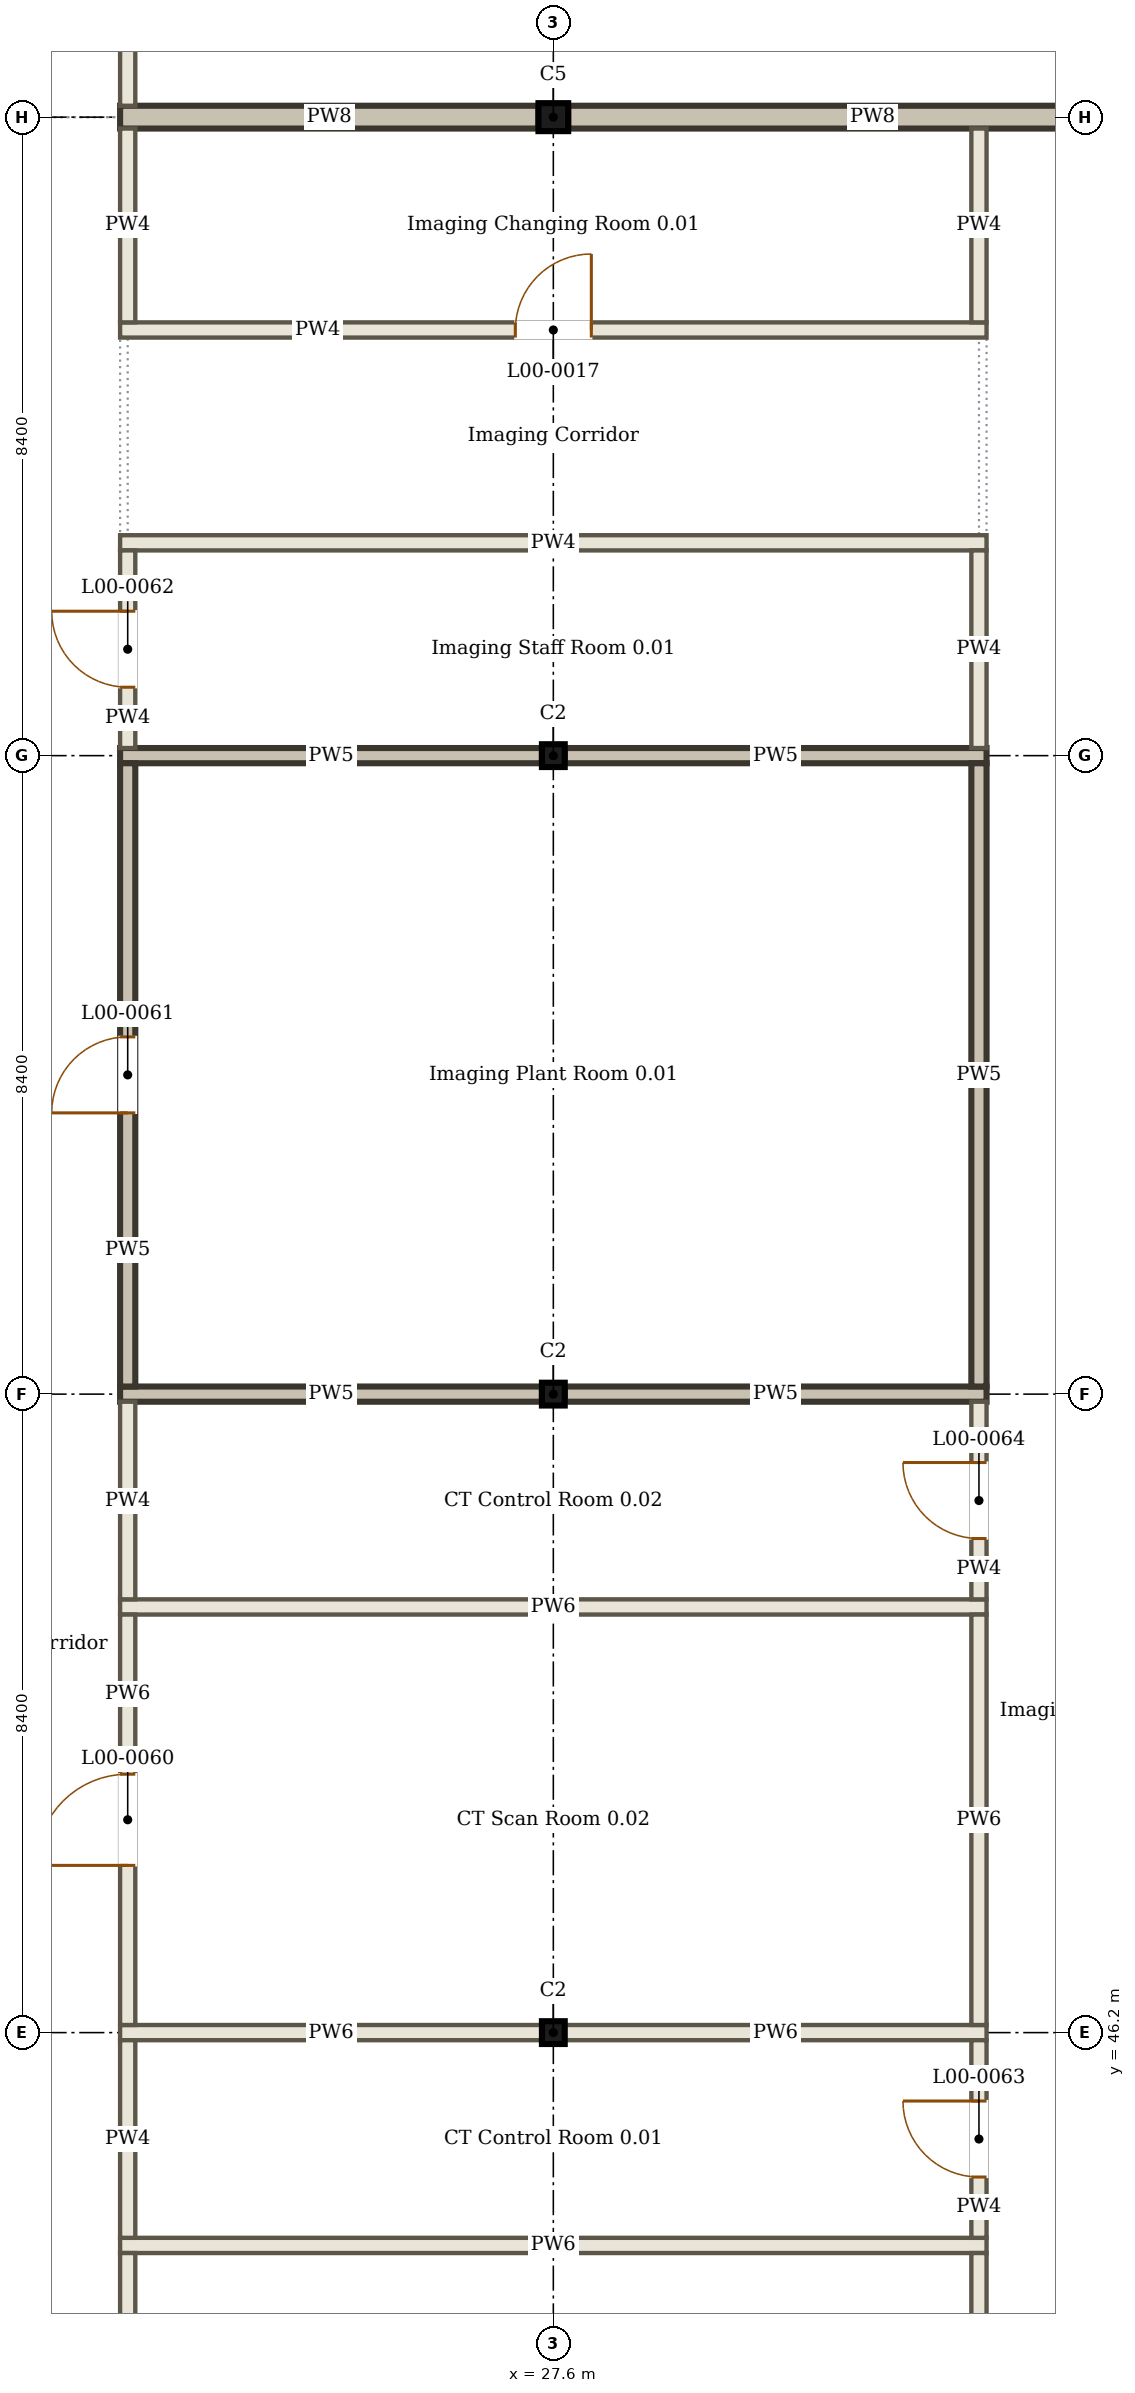
"""IFC4 building model, lengths in metres.
Left out: names, types, materials, properties, quantities, classifications, styles, units other than length and angle.
Written with IfcOpenShell. Run it as: python <this file> out.ifc"""

import sys

from ifc_helpers import new_model, si_unit, direction, frame, frame_2d, origin, origin_2d, place, context, subcontext, project, spatial, rectangle, i_section, extrude, element, fill, save


model = new_model("IFC4")
c1 = context("Model", 3, precision=1e-05, world=origin(), true_north=direction((0.0, 1.0)))
c2 = subcontext(c1, "Body", "Model", "MODEL_VIEW")
j1 = project(units=[si_unit("LENGTHUNIT", "METRE"), si_unit("PLANEANGLEUNIT", "RADIAN")], contexts=[c1])
p1 = place(None, origin())
s1 = spatial("IfcSite", under=j1, at=p1, CompositionType="ELEMENT")
p2 = place(p1, origin())
s2 = spatial("IfcBuilding", under=s1, at=p2, CompositionType="ELEMENT")
p3 = place(p2, origin())
s3 = spatial("IfcBuildingStorey", under=s2, at=p3, CompositionType="ELEMENT", Elevation=0.0)
for number, where, z_axis, x_axis in (
    (1, (27.6, 46.2, 0.0), (0.0, 0.0, 1.0), (1.0, 0.0, 0.0)),
    (2, (27.6, 54.6, 0.0), (0.0, 0.0, 1.0), (1.0, 0.0, 0.0)),
    (3, (27.6, 63.0, 0.0), (0.0, 0.0, 1.0), (1.0, 0.0, 0.0)),
):
    element("IfcColumn", number, at=place(p3, frame(where, z_axis=z_axis, x_axis=x_axis)), inside=s3, PredefinedType="COLUMN", context=c2, shape_type="SweptSolid", body=[
        extrude(i_section(OverallWidth=0.3, OverallDepth=0.3, WebThickness=0.011, FlangeThickness=0.019, FilletRadius=0.027, at=origin_2d()), origin(), (0.0, 0.0, 1.0), 4.5),
    ])
p4 = place(p3, frame((27.6, 71.4, 0.0), z_axis=(0.0, 0.0, 1.0), x_axis=(1.0, 0.0, 0.0)))
e4 = element("IfcColumn", 4, at=p4, inside=s3, PredefinedType="COLUMN", context=c2, shape_type="SweptSolid", body=[
    extrude(i_section(OverallWidth=0.391, OverallDepth=0.368, WebThickness=0.015, FlangeThickness=0.024, FilletRadius=0.027, at=origin_2d()), origin(), (0.0, 0.0, 1.0), 4.5),
])
p5 = place(p3, frame((21.9, 43.4, 0.0), z_axis=(0.0, 0.0, 1.0), x_axis=(1.0, 0.0, 0.0)))
e5 = element("IfcWall", 5, at=p5, inside=s3, PredefinedType="PARTITIONING", context=c2, shape_type="SweptSolid", body=[
    extrude(rectangle(XDim=11.4, YDim=0.2, at=frame_2d((5.7, 0.0))), origin(), (0.0, 0.0, 1.0), 3.8),
])
for number, where, z_axis, x_axis in (
    (6, (21.9, 46.2, 0.0), (0.0, 0.0, 1.0), (1.0, 0.0, 0.0)),
    (7, (27.75, 46.2, 0.0), (0.0, 0.0, 1.0), (1.0, 0.0, 0.0)),
):
    element("IfcWall", number, at=place(p3, frame(where, z_axis=z_axis, x_axis=x_axis)), inside=s3, PredefinedType="PARTITIONING", context=c2, shape_type="SweptSolid", body=[
        extrude(rectangle(XDim=5.55, YDim=0.2, at=frame_2d((2.775, 0.0))), origin(), (0.0, 0.0, 1.0), 3.8),
    ])
p6 = place(p3, frame((21.9, 51.8, 0.0), z_axis=(0.0, 0.0, 1.0), x_axis=(1.0, 0.0, 0.0)))
e8 = element("IfcWall", 8, at=p6, inside=s3, PredefinedType="PARTITIONING", context=c2, shape_type="SweptSolid", body=[
    extrude(rectangle(XDim=11.4, YDim=0.2, at=frame_2d((5.7, 0.0))), origin(), (0.0, 0.0, 1.0), 3.8),
])
for number, where, z_axis, x_axis in (
    (9, (21.9, 54.6, 0.0), (0.0, 0.0, 1.0), (1.0, 0.0, 0.0)),
    (10, (27.75, 54.6, 0.0), (0.0, 0.0, 1.0), (1.0, 0.0, 0.0)),
    (11, (21.9, 63.0, 0.0), (0.0, 0.0, 1.0), (1.0, 0.0, 0.0)),
    (12, (27.75, 63.0, 0.0), (0.0, 0.0, 1.0), (1.0, 0.0, 0.0)),
):
    element("IfcWall", number, at=place(p3, frame(where, z_axis=z_axis, x_axis=x_axis)), inside=s3, PredefinedType="SOLIDWALL", context=c2, shape_type="SweptSolid", body=[
        extrude(rectangle(XDim=5.55, YDim=0.2, at=frame_2d((2.775, 0.0))), origin(), (0.0, 0.0, 1.0), 3.8),
    ])
p7 = place(p3, frame((21.9, 65.8, 0.0), z_axis=(0.0, 0.0, 1.0), x_axis=(1.0, 0.0, 0.0)))
e13 = element("IfcWall", 13, at=p7, inside=s3, PredefinedType="PARTITIONING", context=c2, shape_type="SweptSolid", body=[
    extrude(rectangle(XDim=11.4, YDim=0.2, at=frame_2d((5.7, 0.0))), origin(), (0.0, 0.0, 1.0), 3.8),
])
p8 = place(p3, frame((21.9, 68.6, 0.0), z_axis=(0.0, 0.0, 1.0), x_axis=(1.0, 0.0, 0.0)))
e14 = element("IfcWall", 14, at=p8, inside=s3, PredefinedType="PARTITIONING", context=c2, shape_type="SweptSolid", body=[
    extrude(rectangle(XDim=11.4, YDim=0.2, at=frame_2d((5.7, 0.0))), origin(), (0.0, 0.0, 1.0), 3.8),
])
p9 = place(p8, frame((5.2, 0.0, 0.0)))
e15 = element("IfcOpeningElement", 15, at=p9, cuts=e14, PredefinedType="OPENING", context=c2, shape_type="SweptSolid", body=[
    extrude(rectangle(XDim=1.0, YDim=2.1, at=frame_2d((0.5, 1.05))), frame((0.0, 0.11, 0.0), z_axis=(0.0, -1.0, 0.0), x_axis=(1.0, 0.0, 0.0)), (0.0, 0.0, 1.0), 0.22),
])
p10 = place(p3, frame((21.9, 71.4, 0.0), z_axis=(0.0, 0.0, 1.0), x_axis=(1.0, 0.0, 0.0)))
e16 = element("IfcWall", 16, at=p10, inside=s3, PredefinedType="SOLIDWALL", context=c2, shape_type="SweptSolid", body=[
    extrude(rectangle(XDim=5.505, YDim=0.3, at=frame_2d((2.752, 0.0))), origin(), (0.0, 0.0, 1.0), 3.85),
])
p11 = place(p3, frame((27.795, 71.4, 0.0), z_axis=(0.0, 0.0, 1.0), x_axis=(1.0, 0.0, 0.0)))
e17 = element("IfcWall", 17, at=p11, inside=s3, PredefinedType="SOLIDWALL", context=c2, shape_type="SweptSolid", body=[
    extrude(rectangle(XDim=8.009, YDim=0.3, at=frame_2d((4.004, 0.0))), origin(), (0.0, 0.0, 1.0), 3.85),
])
p12 = place(p3, frame((22.0, 37.9, 0.0), z_axis=(0.0, 0.0, 1.0), x_axis=(0.0, 1.0, 0.0)))
e18 = element("IfcWall", 18, at=p12, inside=s3, PredefinedType="PARTITIONING", context=c2, shape_type="SweptSolid", body=[
    extrude(rectangle(XDim=5.4, YDim=0.2, at=frame_2d((2.7, 0.0))), origin(), (0.0, 0.0, 1.0), 3.8),
])
p13 = place(p12, frame((2.1, 0.0, 0.0)))
e19 = element("IfcOpeningElement", 19, at=p13, cuts=e18, PredefinedType="OPENING", context=c2, shape_type="SweptSolid", body=[
    extrude(rectangle(XDim=1.2, YDim=2.1, at=frame_2d((0.6, 1.05))), frame((0.0, 0.11, 0.0), z_axis=(0.0, -1.0, 0.0), x_axis=(1.0, 0.0, 0.0)), (0.0, 0.0, 1.0), 0.22),
])
p14 = place(p3, frame((22.0, 43.5, 0.0), z_axis=(0.0, 0.0, 1.0), x_axis=(0.0, 1.0, 0.0)))
e20 = element("IfcWall", 20, at=p14, inside=s3, PredefinedType="PARTITIONING", context=c2, shape_type="SweptSolid", body=[
    extrude(rectangle(XDim=2.6, YDim=0.2, at=frame_2d((1.3, 0.0))), origin(), (0.0, 0.0, 1.0), 3.8),
])
p15 = place(p3, frame((22.0, 46.3, 0.0), z_axis=(0.0, 0.0, 1.0), x_axis=(0.0, 1.0, 0.0)))
e21 = element("IfcWall", 21, at=p15, inside=s3, PredefinedType="PARTITIONING", context=c2, shape_type="SweptSolid", body=[
    extrude(rectangle(XDim=5.4, YDim=0.2, at=frame_2d((2.7, 0.0))), origin(), (0.0, 0.0, 1.0), 3.8),
])
p16 = place(p15, frame((2.1, 0.0, 0.0)))
e22 = element("IfcOpeningElement", 22, at=p16, cuts=e21, PredefinedType="OPENING", context=c2, shape_type="SweptSolid", body=[
    extrude(rectangle(XDim=1.2, YDim=2.1, at=frame_2d((0.6, 1.05))), frame((0.0, 0.11, 0.0), z_axis=(0.0, -1.0, 0.0), x_axis=(1.0, 0.0, 0.0)), (0.0, 0.0, 1.0), 0.22),
])
p17 = place(p3, frame((22.0, 51.9, 0.0), z_axis=(0.0, 0.0, 1.0), x_axis=(0.0, 1.0, 0.0)))
e23 = element("IfcWall", 23, at=p17, inside=s3, PredefinedType="PARTITIONING", context=c2, shape_type="SweptSolid", body=[
    extrude(rectangle(XDim=2.6, YDim=0.2, at=frame_2d((1.3, 0.0))), origin(), (0.0, 0.0, 1.0), 3.8),
])
p18 = place(p3, frame((22.0, 54.7, 0.0), z_axis=(0.0, 0.0, 1.0), x_axis=(0.0, 1.0, 0.0)))
e24 = element("IfcWall", 24, at=p18, inside=s3, PredefinedType="SOLIDWALL", context=c2, shape_type="SweptSolid", body=[
    extrude(rectangle(XDim=8.2, YDim=0.2, at=frame_2d((4.1, 0.0))), origin(), (0.0, 0.0, 1.0), 3.8),
])
p19 = place(p18, frame((3.6, 0.0, 0.0)))
e25 = element("IfcOpeningElement", 25, at=p19, cuts=e24, PredefinedType="OPENING", context=c2, shape_type="SweptSolid", body=[
    extrude(rectangle(XDim=1.0, YDim=2.1, at=frame_2d((0.5, 1.05))), frame((0.0, 0.11, 0.0), z_axis=(0.0, -1.0, 0.0), x_axis=(1.0, 0.0, 0.0)), (0.0, 0.0, 1.0), 0.22),
])
p20 = place(p3, frame((22.0, 63.1, 0.0), z_axis=(0.0, 0.0, 1.0), x_axis=(0.0, 1.0, 0.0)))
e26 = element("IfcWall", 26, at=p20, inside=s3, PredefinedType="PARTITIONING", context=c2, shape_type="SweptSolid", body=[
    extrude(rectangle(XDim=2.6, YDim=0.2, at=frame_2d((1.3, 0.0))), origin(), (0.0, 0.0, 1.0), 3.8),
])
p21 = place(p20, frame((0.8, 0.0, 0.0)))
e27 = element("IfcOpeningElement", 27, at=p21, cuts=e26, PredefinedType="OPENING", context=c2, shape_type="SweptSolid", body=[
    extrude(rectangle(XDim=1.0, YDim=2.1, at=frame_2d((0.5, 1.05))), frame((0.0, 0.11, 0.0), z_axis=(0.0, -1.0, 0.0), x_axis=(1.0, 0.0, 0.0)), (0.0, 0.0, 1.0), 0.22),
])
p22 = place(p3, frame((22.0, 68.7, 0.0), z_axis=(0.0, 0.0, 1.0), x_axis=(0.0, 1.0, 0.0)))
e28 = element("IfcWall", 28, at=p22, inside=s3, PredefinedType="PARTITIONING", context=c2, shape_type="SweptSolid", body=[
    extrude(rectangle(XDim=2.55, YDim=0.2, at=frame_2d((1.275, 0.0))), origin(), (0.0, 0.0, 1.0), 3.95),
])
p23 = place(p3, frame((22.0, 71.55, 0.0), z_axis=(0.0, 0.0, 1.0), x_axis=(0.0, 1.0, 0.0)))
e29 = element("IfcWall", 29, at=p23, inside=s3, PredefinedType="PARTITIONING", context=c2, shape_type="SweptSolid", body=[
    extrude(rectangle(XDim=13.75, YDim=0.2, at=frame_2d((6.875, 0.0))), origin(), (0.0, 0.0, 1.0), 3.8),
])
p24 = place(p3, frame((33.2, 37.9, 0.0), z_axis=(0.0, 0.0, 1.0), x_axis=(0.0, 1.0, 0.0)))
e30 = element("IfcWall", 30, at=p24, inside=s3, PredefinedType="PARTITIONING", context=c2, shape_type="SweptSolid", body=[
    extrude(rectangle(XDim=5.4, YDim=0.2, at=frame_2d((2.7, 0.0))), origin(), (0.0, 0.0, 1.0), 3.8),
])
p25 = place(p3, frame((33.2, 43.5, 0.0), z_axis=(0.0, 0.0, 1.0), x_axis=(0.0, 1.0, 0.0)))
e31 = element("IfcWall", 31, at=p25, inside=s3, PredefinedType="PARTITIONING", context=c2, shape_type="SweptSolid", body=[
    extrude(rectangle(XDim=2.6, YDim=0.2, at=frame_2d((1.3, 0.0))), origin(), (0.0, 0.0, 1.0), 3.8),
])
p26 = place(p25, frame((0.8, 0.0, 0.0)))
e32 = element("IfcOpeningElement", 32, at=p26, cuts=e31, PredefinedType="OPENING", context=c2, shape_type="SweptSolid", body=[
    extrude(rectangle(XDim=1.0, YDim=2.1, at=frame_2d((0.5, 1.05))), frame((0.0, 0.11, 0.0), z_axis=(0.0, -1.0, 0.0), x_axis=(1.0, 0.0, 0.0)), (0.0, 0.0, 1.0), 0.22),
])
p27 = place(p3, frame((33.2, 46.3, 0.0), z_axis=(0.0, 0.0, 1.0), x_axis=(0.0, 1.0, 0.0)))
e33 = element("IfcWall", 33, at=p27, inside=s3, PredefinedType="PARTITIONING", context=c2, shape_type="SweptSolid", body=[
    extrude(rectangle(XDim=5.4, YDim=0.2, at=frame_2d((2.7, 0.0))), origin(), (0.0, 0.0, 1.0), 3.8),
])
p28 = place(p3, frame((33.2, 51.9, 0.0), z_axis=(0.0, 0.0, 1.0), x_axis=(0.0, 1.0, 0.0)))
e34 = element("IfcWall", 34, at=p28, inside=s3, PredefinedType="PARTITIONING", context=c2, shape_type="SweptSolid", body=[
    extrude(rectangle(XDim=2.6, YDim=0.2, at=frame_2d((1.3, 0.0))), origin(), (0.0, 0.0, 1.0), 3.8),
])
p29 = place(p28, frame((0.8, 0.0, 0.0)))
e35 = element("IfcOpeningElement", 35, at=p29, cuts=e34, PredefinedType="OPENING", context=c2, shape_type="SweptSolid", body=[
    extrude(rectangle(XDim=1.0, YDim=2.1, at=frame_2d((0.5, 1.05))), frame((0.0, 0.11, 0.0), z_axis=(0.0, -1.0, 0.0), x_axis=(1.0, 0.0, 0.0)), (0.0, 0.0, 1.0), 0.22),
])
p30 = place(p3, frame((33.2, 54.7, 0.0), z_axis=(0.0, 0.0, 1.0), x_axis=(0.0, 1.0, 0.0)))
e36 = element("IfcWall", 36, at=p30, inside=s3, PredefinedType="SOLIDWALL", context=c2, shape_type="SweptSolid", body=[
    extrude(rectangle(XDim=8.2, YDim=0.2, at=frame_2d((4.1, 0.0))), origin(), (0.0, 0.0, 1.0), 3.8),
])
p31 = place(p3, frame((33.2, 63.1, 0.0), z_axis=(0.0, 0.0, 1.0), x_axis=(0.0, 1.0, 0.0)))
e37 = element("IfcWall", 37, at=p31, inside=s3, PredefinedType="PARTITIONING", context=c2, shape_type="SweptSolid", body=[
    extrude(rectangle(XDim=2.6, YDim=0.2, at=frame_2d((1.3, 0.0))), origin(), (0.0, 0.0, 1.0), 3.8),
])
p32 = place(p3, frame((33.2, 68.7, 0.0), z_axis=(0.0, 0.0, 1.0), x_axis=(0.0, 1.0, 0.0)))
e38 = element("IfcWall", 38, at=p32, inside=s3, PredefinedType="PARTITIONING", context=c2, shape_type="SweptSolid", body=[
    extrude(rectangle(XDim=2.55, YDim=0.2, at=frame_2d((1.275, 0.0))), origin(), (0.0, 0.0, 1.0), 3.95),
])
p33 = place(p9, origin())
e39 = element("IfcDoor", 39, at=p33, inside=s3, OperationType="SINGLE_SWING_RIGHT", PredefinedType="DOOR", context=c2, shape_type="SweptSolid", body=[
    extrude(rectangle(XDim=1.0, YDim=2.1, at=frame_2d((0.5, 1.05))), frame((0.0, 0.025, 0.0), z_axis=(0.0, -1.0, 0.0), x_axis=(1.0, 0.0, 0.0)), (0.0, 0.0, 1.0), 0.05),
])
fill(e15, e39)
p34 = place(p16, origin())
e40 = element("IfcDoor", 40, at=p34, inside=s3, OperationType="SINGLE_SWING_LEFT", PredefinedType="DOOR", context=c2, shape_type="SweptSolid", body=[
    extrude(rectangle(XDim=1.2, YDim=2.1, at=frame_2d((0.6, 1.05))), frame((0.0, 0.025, 0.0), z_axis=(0.0, -1.0, 0.0), x_axis=(1.0, 0.0, 0.0)), (0.0, 0.0, 1.0), 0.05),
])
fill(e22, e40)
p35 = place(p19, origin())
e41 = element("IfcDoor", 41, at=p35, inside=s3, OperationType="SINGLE_SWING_LEFT", PredefinedType="DOOR", context=c2, shape_type="SweptSolid", body=[
    extrude(rectangle(XDim=1.0, YDim=2.1, at=frame_2d((0.5, 1.05))), frame((0.0, 0.025, 0.0), z_axis=(0.0, -1.0, 0.0), x_axis=(1.0, 0.0, 0.0)), (0.0, 0.0, 1.0), 0.05),
])
fill(e25, e41)
p36 = place(p21, origin())
e42 = element("IfcDoor", 42, at=p36, inside=s3, OperationType="SINGLE_SWING_RIGHT", PredefinedType="DOOR", context=c2, shape_type="SweptSolid", body=[
    extrude(rectangle(XDim=1.0, YDim=2.1, at=frame_2d((0.5, 1.05))), frame((0.0, 0.025, 0.0), z_axis=(0.0, -1.0, 0.0), x_axis=(1.0, 0.0, 0.0)), (0.0, 0.0, 1.0), 0.05),
])
fill(e27, e42)
p37 = place(p26, origin())
e43 = element("IfcDoor", 43, at=p37, inside=s3, OperationType="SINGLE_SWING_RIGHT", PredefinedType="DOOR", context=c2, shape_type="SweptSolid", body=[
    extrude(rectangle(XDim=1.0, YDim=2.1, at=frame_2d((0.5, 1.05))), frame((0.0, 0.025, 0.0), z_axis=(0.0, -1.0, 0.0), x_axis=(1.0, 0.0, 0.0)), (0.0, 0.0, 1.0), 0.05),
])
fill(e32, e43)
p38 = place(p29, origin())
e44 = element("IfcDoor", 44, at=p38, inside=s3, OperationType="SINGLE_SWING_RIGHT", PredefinedType="DOOR", context=c2, shape_type="SweptSolid", body=[
    extrude(rectangle(XDim=1.0, YDim=2.1, at=frame_2d((0.5, 1.05))), frame((0.0, 0.025, 0.0), z_axis=(0.0, -1.0, 0.0), x_axis=(1.0, 0.0, 0.0)), (0.0, 0.0, 1.0), 0.05),
])
fill(e35, e44)
save(model, sys.argv[1])
